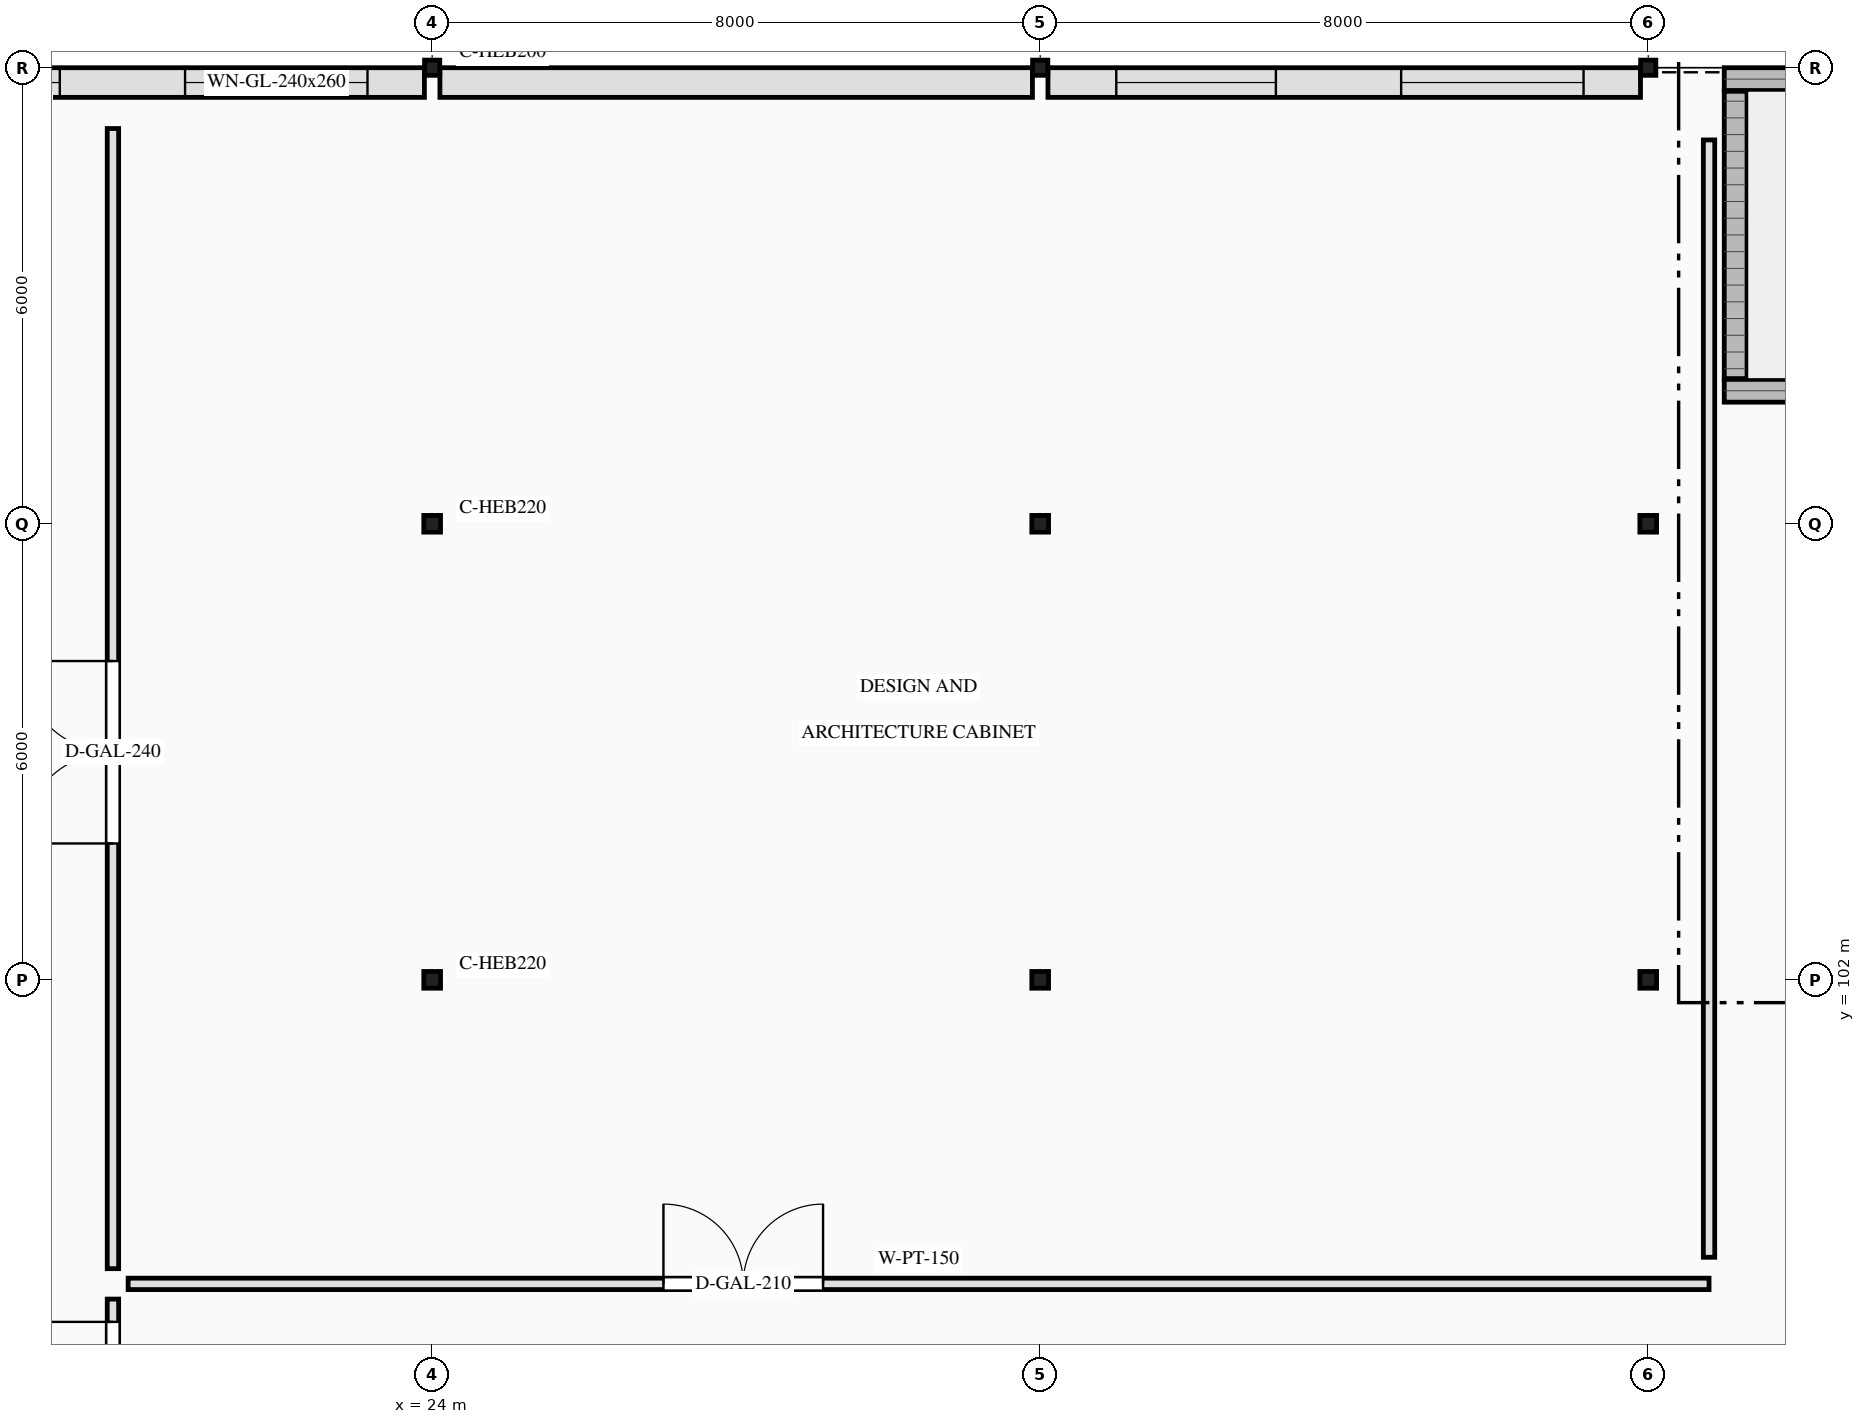
"""IFC4 building model, lengths in metres.
Left out: names, types, materials, properties, quantities, classifications, styles, units other than length and angle.
Written with IfcOpenShell. Run it as: python <this file> out.ifc"""

import sys

from ifc_helpers import new_model, si_unit, direction, frame, frame_2d, origin, origin_2d, place, context, subcontext, project, spatial, rectangle, i_section, extrude, element, fill, save


model = new_model("IFC4")
c1 = context("Model", 3, precision=1e-05, world=origin(), true_north=direction((0.0, 1.0)))
c2 = subcontext(c1, "Body", "Model", "MODEL_VIEW")
j1 = project(units=[si_unit("LENGTHUNIT", "METRE"), si_unit("PLANEANGLEUNIT", "RADIAN")], contexts=[c1])
p1 = place(None, origin())
s1 = spatial("IfcSite", under=j1, at=p1, CompositionType="ELEMENT")
p2 = place(p1, origin())
s2 = spatial("IfcBuilding", under=s1, at=p2, CompositionType="ELEMENT")
p3 = place(p2, frame((0.0, 0.0, 21.8)))
s3 = spatial("IfcBuildingStorey", under=s2, at=p3, CompositionType="ELEMENT", Elevation=21.8)
for number, where, z_axis, x_axis in (
    (1, (41.0, 109.75, 0.0), (0.0, 0.0, 1.0), (1.0, 0.0, 0.0)),
    (2, (41.0, 113.85, 0.0), (0.0, 0.0, 1.0), (1.0, 0.0, 0.0)),
):
    element("IfcWall", number, at=place(p3, frame(where, z_axis=z_axis, x_axis=x_axis)), inside=s3, PredefinedType="SHEAR", context=c2, shape_type="SweptSolid", body=[
        extrude(rectangle(XDim=10.0, YDim=0.3, at=frame_2d((5.0, 0.0))), origin(), (0.0, 0.0, 1.0), 6.3),
    ])
p4 = place(p3, frame((41.15, 109.91, 0.0), z_axis=(0.0, 0.0, 1.0), x_axis=(0.0, 1.0, 0.0)))
e3 = element("IfcWall", 3, at=p4, inside=s3, PredefinedType="SHEAR", context=c2, shape_type="SweptSolid", body=[
    extrude(rectangle(XDim=3.78, YDim=0.3, at=frame_2d((1.89, 0.0))), origin(), (0.0, 0.0, 1.0), 6.3),
])
for number, where, z_axis, x_axis in (
    (4, (24.0, 102.0, 0.0), (0.0, 0.0, 1.0), (1.0, 0.0, 0.0)),
    (5, (24.0, 108.0, 0.0), (0.0, 0.0, 1.0), (1.0, 0.0, 0.0)),
):
    element("IfcColumn", number, at=place(p3, frame(where, z_axis=z_axis, x_axis=x_axis)), inside=s3, PredefinedType="COLUMN", context=c2, shape_type="SweptSolid", body=[
        extrude(i_section(OverallWidth=0.22, OverallDepth=0.22, WebThickness=0.01, FlangeThickness=0.016, FilletRadius=0.018, at=origin_2d()), origin(), (0.0, 0.0, 1.0), 4.2),
    ])
p5 = place(p3, frame((24.0, 114.0, 0.0), z_axis=(0.0, 0.0, 1.0), x_axis=(1.0, 0.0, 0.0)))
e6 = element("IfcColumn", 6, at=p5, inside=s3, PredefinedType="COLUMN", context=c2, shape_type="SweptSolid", body=[
    extrude(i_section(OverallWidth=0.2, OverallDepth=0.2, WebThickness=0.009, FlangeThickness=0.015, FilletRadius=0.018, at=origin_2d()), origin(), (0.0, 0.0, 1.0), 4.2),
])
for number, where, z_axis, x_axis in (
    (7, (32.0, 102.0, 0.0), (0.0, 0.0, 1.0), (1.0, 0.0, 0.0)),
    (8, (32.0, 108.0, 0.0), (0.0, 0.0, 1.0), (1.0, 0.0, 0.0)),
):
    element("IfcColumn", number, at=place(p3, frame(where, z_axis=z_axis, x_axis=x_axis)), inside=s3, PredefinedType="COLUMN", context=c2, shape_type="SweptSolid", body=[
        extrude(i_section(OverallWidth=0.22, OverallDepth=0.22, WebThickness=0.01, FlangeThickness=0.016, FilletRadius=0.018, at=origin_2d()), origin(), (0.0, 0.0, 1.0), 4.2),
    ])
p6 = place(p3, frame((32.0, 114.0, 0.0), z_axis=(0.0, 0.0, 1.0), x_axis=(1.0, 0.0, 0.0)))
e9 = element("IfcColumn", 9, at=p6, inside=s3, PredefinedType="COLUMN", context=c2, shape_type="SweptSolid", body=[
    extrude(i_section(OverallWidth=0.2, OverallDepth=0.2, WebThickness=0.009, FlangeThickness=0.015, FilletRadius=0.018, at=origin_2d()), origin(), (0.0, 0.0, 1.0), 4.2),
])
for number, where, z_axis, x_axis in (
    (10, (40.0, 102.0, 0.0), (0.0, 0.0, 1.0), (1.0, 0.0, 0.0)),
    (11, (40.0, 108.0, 0.0), (0.0, 0.0, 1.0), (1.0, 0.0, 0.0)),
):
    element("IfcColumn", number, at=place(p3, frame(where, z_axis=z_axis, x_axis=x_axis)), inside=s3, PredefinedType="COLUMN", context=c2, shape_type="SweptSolid", body=[
        extrude(i_section(OverallWidth=0.22, OverallDepth=0.22, WebThickness=0.01, FlangeThickness=0.016, FilletRadius=0.018, at=origin_2d()), origin(), (0.0, 0.0, 1.0), 4.2),
    ])
p7 = place(p3, frame((40.0, 114.0, 0.0), z_axis=(0.0, 0.0, 1.0), x_axis=(1.0, 0.0, 0.0)))
e12 = element("IfcColumn", 12, at=p7, inside=s3, PredefinedType="COLUMN", context=c2, shape_type="SweptSolid", body=[
    extrude(i_section(OverallWidth=0.2, OverallDepth=0.2, WebThickness=0.009, FlangeThickness=0.015, FilletRadius=0.018, at=origin_2d()), origin(), (0.0, 0.0, 1.0), 4.2),
])
p8 = place(p3, frame((16.102, 113.805, 0.0), z_axis=(0.0, 0.0, 1.0), x_axis=(1.0, 0.0, 0.0)))
e13 = element("IfcWall", 13, at=p8, inside=s3, PredefinedType="SOLIDWALL", context=c2, shape_type="SweptSolid", body=[
    extrude(rectangle(XDim=7.796, YDim=0.39, at=frame_2d((3.898, 0.0))), origin(), (0.0, 0.0, 1.0), 3.92),
])
p9 = place(p8, frame((0.899, 0.0, 0.85)))
e14 = element("IfcOpeningElement", 14, at=p9, cuts=e13, PredefinedType="OPENING", context=c2, shape_type="SweptSolid", body=[
    extrude(rectangle(XDim=2.1, YDim=2.5, at=frame_2d((1.05, 1.25))), frame((0.0, 0.205, 0.0), z_axis=(0.0, -1.0, 0.0), x_axis=(1.0, 0.0, 0.0)), (0.0, 0.0, 1.0), 0.41),
])
p10 = place(p8, frame((4.647, 0.0, 0.85)))
e15 = element("IfcOpeningElement", 15, at=p10, cuts=e13, PredefinedType="OPENING", context=c2, shape_type="SweptSolid", body=[
    extrude(rectangle(XDim=2.4, YDim=2.6, at=frame_2d((1.2, 1.3))), frame((0.0, 0.205, 0.0), z_axis=(0.0, -1.0, 0.0), x_axis=(1.0, 0.0, 0.0)), (0.0, 0.0, 1.0), 0.41),
])
p11 = place(p3, frame((24.102, 113.805, 0.0), z_axis=(0.0, 0.0, 1.0), x_axis=(1.0, 0.0, 0.0)))
e16 = element("IfcWall", 16, at=p11, inside=s3, PredefinedType="SOLIDWALL", context=c2, shape_type="SweptSolid", body=[
    extrude(rectangle(XDim=7.796, YDim=0.39, at=frame_2d((3.898, 0.0))), origin(), (0.0, 0.0, 1.0), 3.92),
])
p12 = place(p3, frame((32.102, 113.805, 0.0), z_axis=(0.0, 0.0, 1.0), x_axis=(1.0, 0.0, 0.0)))
e17 = element("IfcWall", 17, at=p12, inside=s3, PredefinedType="SOLIDWALL", context=c2, shape_type="SweptSolid", body=[
    extrude(rectangle(XDim=7.796, YDim=0.39, at=frame_2d((3.898, 0.0))), origin(), (0.0, 0.0, 1.0), 3.92),
])
p13 = place(p12, frame((0.899, 0.0, 0.85)))
e18 = element("IfcOpeningElement", 18, at=p13, cuts=e17, PredefinedType="OPENING", context=c2, shape_type="SweptSolid", body=[
    extrude(rectangle(XDim=2.1, YDim=2.5, at=frame_2d((1.05, 1.25))), frame((0.0, 0.205, 0.0), z_axis=(0.0, -1.0, 0.0), x_axis=(1.0, 0.0, 0.0)), (0.0, 0.0, 1.0), 0.41),
])
p14 = place(p12, frame((4.647, 0.0, 0.85)))
e19 = element("IfcOpeningElement", 19, at=p14, cuts=e17, PredefinedType="OPENING", context=c2, shape_type="SweptSolid", body=[
    extrude(rectangle(XDim=2.4, YDim=2.6, at=frame_2d((1.2, 1.3))), frame((0.0, 0.205, 0.0), z_axis=(0.0, -1.0, 0.0), x_axis=(1.0, 0.0, 0.0)), (0.0, 0.0, 1.0), 0.41),
])
p15 = place(p3, frame((19.8, 94.2, 0.0), z_axis=(0.0, 0.0, 1.0), x_axis=(0.0, 1.0, 0.0)))
e20 = element("IfcWall", 20, at=p15, inside=s3, PredefinedType="PARTITIONING", context=c2, shape_type="SweptSolid", body=[
    extrude(rectangle(XDim=3.6, YDim=0.15, at=frame_2d((1.8, 0.0))), origin(), (0.0, 0.0, 1.0), 3.92),
])
p16 = place(p15, frame((0.9, 0.0, 0.0)))
e21 = element("IfcOpeningElement", 21, at=p16, cuts=e20, PredefinedType="OPENING", context=c2, shape_type="SweptSolid", body=[
    extrude(rectangle(XDim=2.4, YDim=2.75, at=frame_2d((1.2, 1.375))), frame((0.0, 0.085, 0.0), z_axis=(0.0, -1.0, 0.0), x_axis=(1.0, 0.0, 0.0)), (0.0, 0.0, 1.0), 0.17),
])
p17 = place(p3, frame((20.0, 98.0, 0.0), z_axis=(0.0, 0.0, 1.0), x_axis=(1.0, 0.0, 0.0)))
e22 = element("IfcWall", 22, at=p17, inside=s3, PredefinedType="PARTITIONING", context=c2, shape_type="SweptSolid", body=[
    extrude(rectangle(XDim=20.8, YDim=0.15, at=frame_2d((10.4, 0.0))), origin(), (0.0, 0.0, 1.0), 3.92),
])
p18 = place(p17, frame((7.043, 0.0, 0.0)))
e23 = element("IfcOpeningElement", 23, at=p18, cuts=e22, PredefinedType="OPENING", context=c2, shape_type="SweptSolid", body=[
    extrude(rectangle(XDim=2.1, YDim=2.6, at=frame_2d((1.05, 1.3))), frame((0.0, 0.085, 0.0), z_axis=(0.0, -1.0, 0.0), x_axis=(1.0, 0.0, 0.0)), (0.0, 0.0, 1.0), 0.17),
])
p19 = place(p3, frame((19.8, 98.2, 0.0), z_axis=(0.0, 0.0, 1.0), x_axis=(0.0, 1.0, 0.0)))
e24 = element("IfcWall", 24, at=p19, inside=s3, PredefinedType="PARTITIONING", context=c2, shape_type="SweptSolid", body=[
    extrude(rectangle(XDim=15.0, YDim=0.15, at=frame_2d((7.5, 0.0))), origin(), (0.0, 0.0, 1.0), 3.92),
])
p20 = place(p19, frame((5.594, 0.0, 0.0)))
e25 = element("IfcOpeningElement", 25, at=p20, cuts=e24, PredefinedType="OPENING", context=c2, shape_type="SweptSolid", body=[
    extrude(rectangle(XDim=2.4, YDim=2.75, at=frame_2d((1.2, 1.375))), frame((0.0, 0.085, 0.0), z_axis=(0.0, -1.0, 0.0), x_axis=(1.0, 0.0, 0.0)), (0.0, 0.0, 1.0), 0.17),
])
p21 = place(p3, frame((40.8, 98.35, 0.0), z_axis=(0.0, 0.0, 1.0), x_axis=(0.0, 1.0, 0.0)))
e26 = element("IfcWall", 26, at=p21, inside=s3, PredefinedType="PARTITIONING", context=c2, shape_type="SweptSolid", body=[
    extrude(rectangle(XDim=14.7, YDim=0.15, at=frame_2d((7.35, 0.0))), origin(), (0.0, 0.0, 1.0), 3.92),
])
p22 = place(p9, origin())
e27 = element("IfcWindow", 27, at=p22, inside=s3, PartitioningType="DOUBLE_PANEL_VERTICAL", PredefinedType="WINDOW", context=c2, shape_type="SweptSolid", body=[
    extrude(rectangle(XDim=2.1, YDim=2.5, at=frame_2d((1.05, 1.25))), frame((0.0, 0.03, 0.0), z_axis=(0.0, -1.0, 0.0), x_axis=(1.0, 0.0, 0.0)), (0.0, 0.0, 1.0), 0.06),
])
fill(e14, e27)
p23 = place(p10, origin())
e28 = element("IfcWindow", 28, at=p23, inside=s3, PartitioningType="TRIPLE_PANEL_VERTICAL", PredefinedType="WINDOW", context=c2, shape_type="SweptSolid", body=[
    extrude(rectangle(XDim=2.4, YDim=2.6, at=frame_2d((1.2, 1.3))), frame((0.0, 0.03, 0.0), z_axis=(0.0, -1.0, 0.0), x_axis=(1.0, 0.0, 0.0)), (0.0, 0.0, 1.0), 0.06),
])
fill(e15, e28)
p24 = place(p13, origin())
e29 = element("IfcWindow", 29, at=p24, inside=s3, PartitioningType="DOUBLE_PANEL_VERTICAL", PredefinedType="WINDOW", context=c2, shape_type="SweptSolid", body=[
    extrude(rectangle(XDim=2.1, YDim=2.5, at=frame_2d((1.05, 1.25))), frame((0.0, 0.03, 0.0), z_axis=(0.0, -1.0, 0.0), x_axis=(1.0, 0.0, 0.0)), (0.0, 0.0, 1.0), 0.06),
])
fill(e18, e29)
p25 = place(p14, origin())
e30 = element("IfcWindow", 30, at=p25, inside=s3, PartitioningType="TRIPLE_PANEL_VERTICAL", PredefinedType="WINDOW", context=c2, shape_type="SweptSolid", body=[
    extrude(rectangle(XDim=2.4, YDim=2.6, at=frame_2d((1.2, 1.3))), frame((0.0, 0.03, 0.0), z_axis=(0.0, -1.0, 0.0), x_axis=(1.0, 0.0, 0.0)), (0.0, 0.0, 1.0), 0.06),
])
fill(e19, e30)
p26 = place(p16, origin())
e31 = element("IfcDoor", 31, at=p26, inside=s3, OperationType="DOUBLE_DOOR_DOUBLE_SWING", PredefinedType="DOOR", context=c2, shape_type="SweptSolid", body=[
    extrude(rectangle(XDim=2.4, YDim=2.75, at=frame_2d((1.2, 1.375))), frame((0.0, 0.025, 0.0), z_axis=(0.0, -1.0, 0.0), x_axis=(1.0, 0.0, 0.0)), (0.0, 0.0, 1.0), 0.05),
])
fill(e21, e31)
p27 = place(p18, origin())
e32 = element("IfcDoor", 32, at=p27, inside=s3, OperationType="DOUBLE_DOOR_SINGLE_SWING", PredefinedType="DOOR", context=c2, shape_type="SweptSolid", body=[
    extrude(rectangle(XDim=2.1, YDim=2.6, at=frame_2d((1.05, 1.3))), frame((0.0, 0.025, 0.0), z_axis=(0.0, -1.0, 0.0), x_axis=(1.0, 0.0, 0.0)), (0.0, 0.0, 1.0), 0.05),
])
fill(e23, e32)
p28 = place(p20, origin())
e33 = element("IfcDoor", 33, at=p28, inside=s3, OperationType="DOUBLE_DOOR_DOUBLE_SWING", PredefinedType="DOOR", context=c2, shape_type="SweptSolid", body=[
    extrude(rectangle(XDim=2.4, YDim=2.75, at=frame_2d((1.2, 1.375))), frame((0.0, 0.025, 0.0), z_axis=(0.0, -1.0, 0.0), x_axis=(1.0, 0.0, 0.0)), (0.0, 0.0, 1.0), 0.05),
])
fill(e25, e33)
save(model, sys.argv[1])
